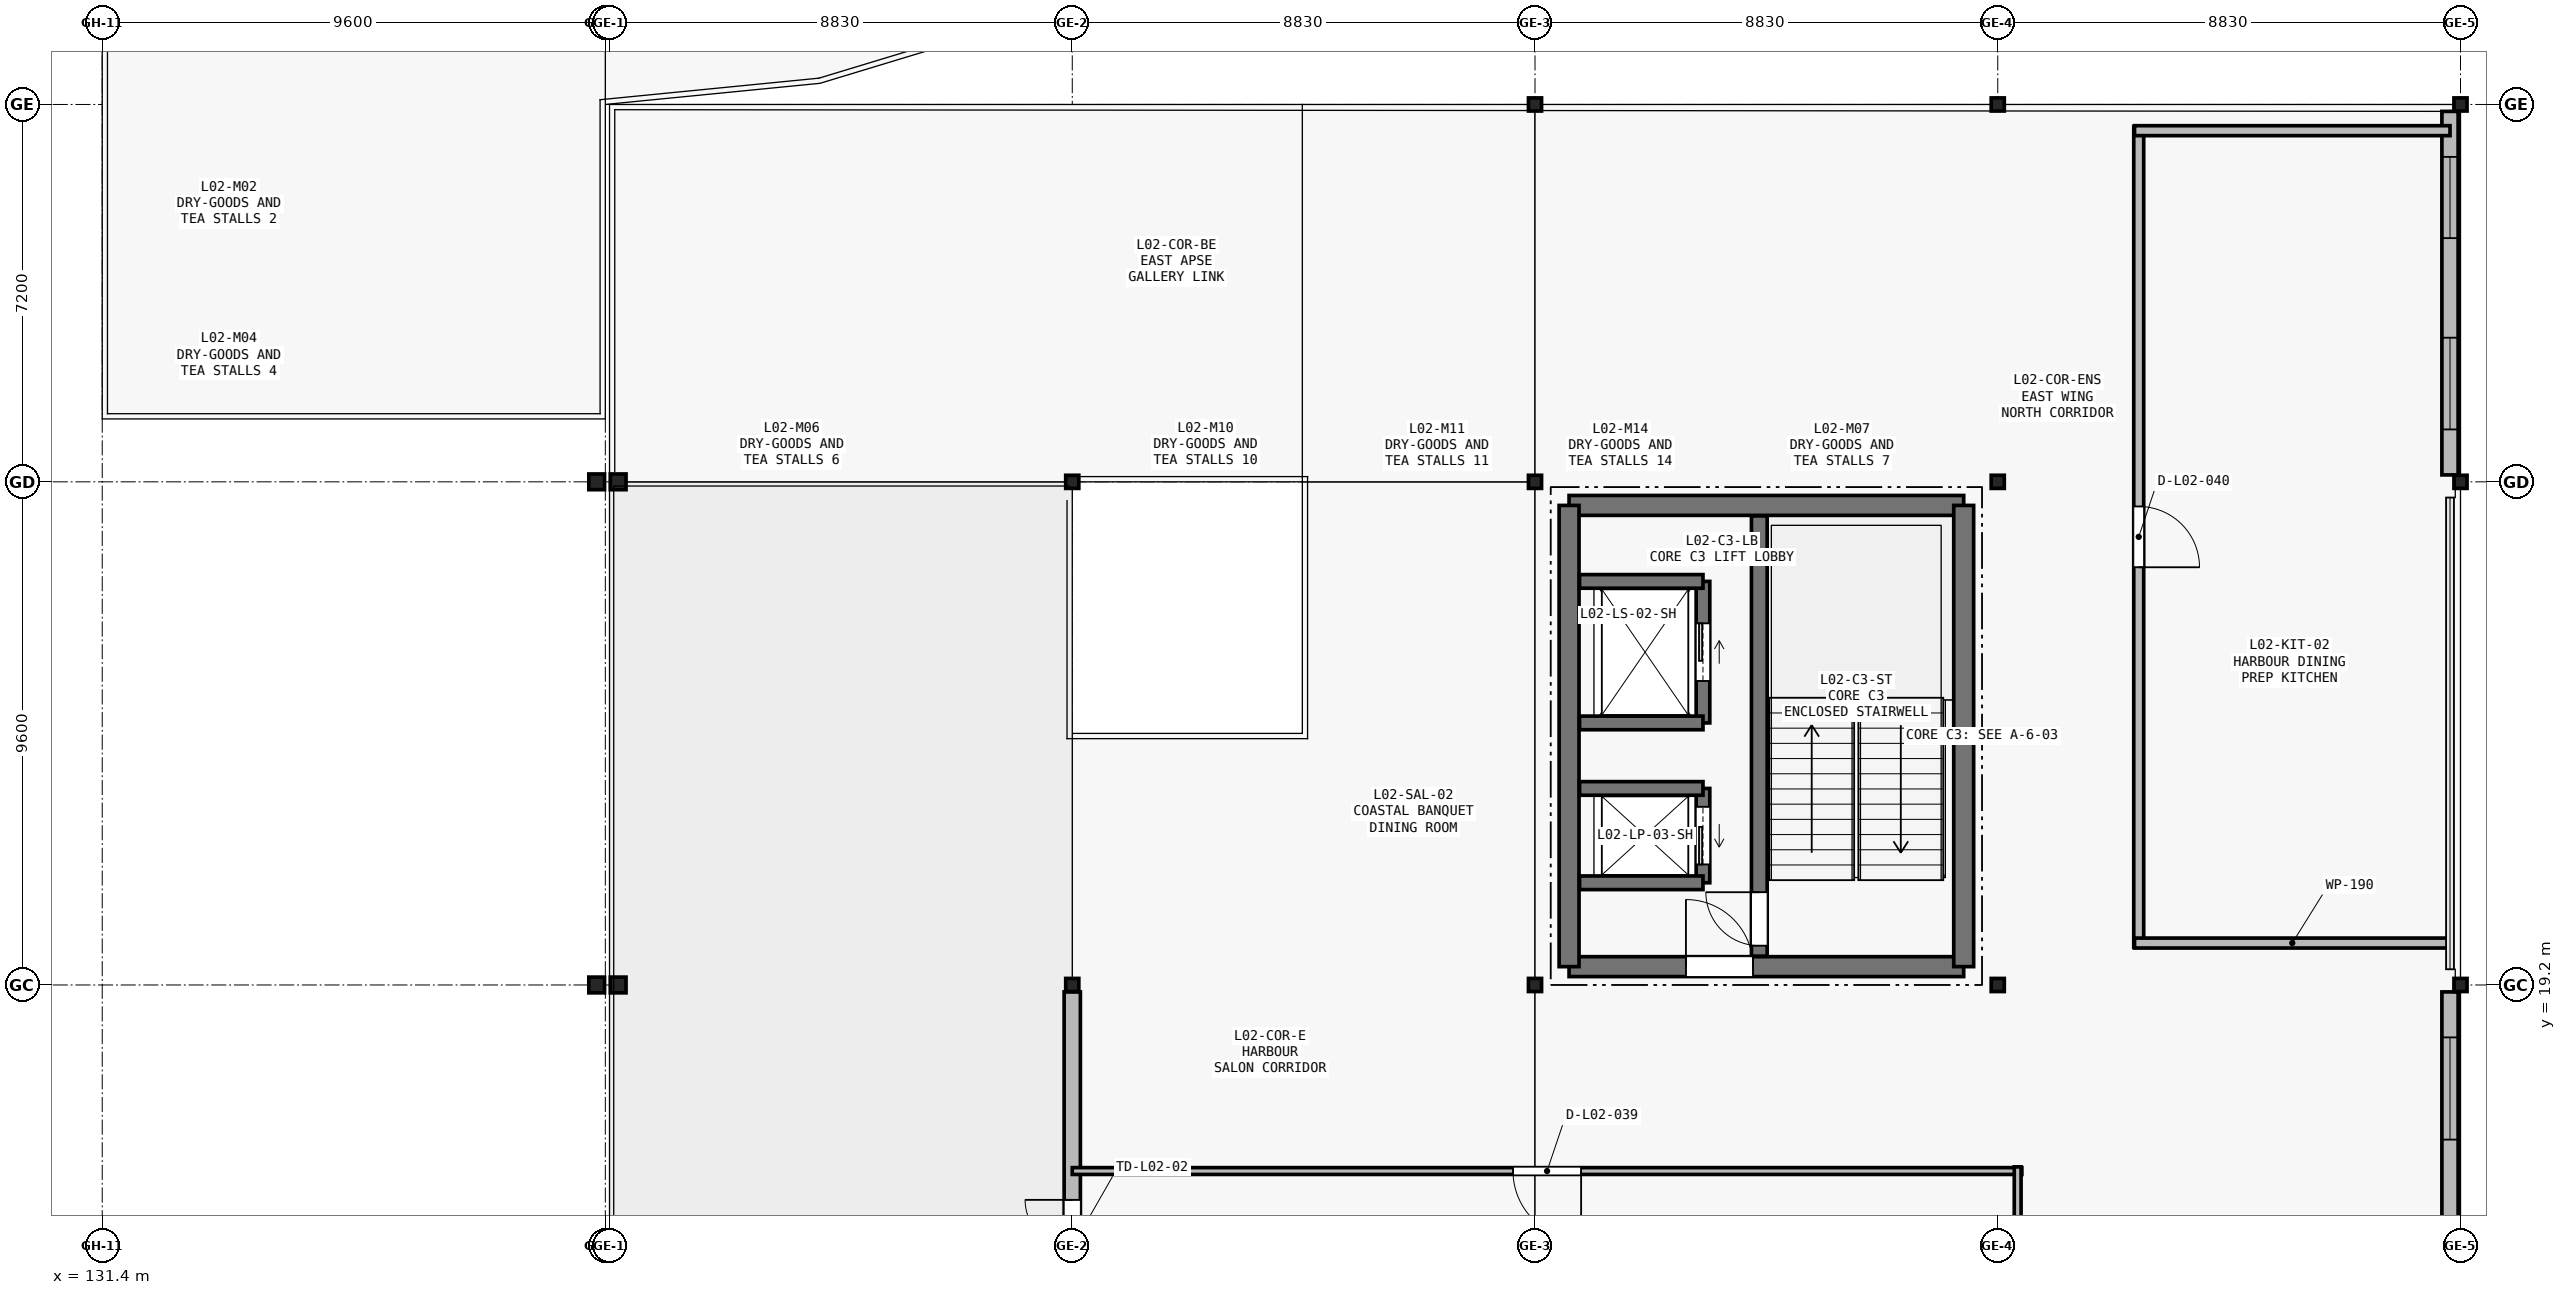
"""IFC4 building model, lengths in metres.
Left out: names, types, materials, properties, quantities, classifications, styles, units other than length and angle.
Written with IfcOpenShell. Run it as: python <this file> out.ifc"""

import sys

from ifc_helpers import new_model, si_unit, direction, frame, frame_2d, origin, origin_2d, place, context, subcontext, project, spatial, rectangle, i_section, extrude, element, fill, save


model = new_model("IFC4")
c1 = context("Model", 3, precision=1e-05, world=origin(), true_north=direction((0.0, 1.0)))
c2 = subcontext(c1, "Body", "Model", "MODEL_VIEW")
j1 = project(units=[si_unit("LENGTHUNIT", "METRE"), si_unit("PLANEANGLEUNIT", "RADIAN")], contexts=[c1])
p1 = place(None, origin())
s1 = spatial("IfcSite", under=j1, at=p1, CompositionType="ELEMENT")
p2 = place(p1, origin())
s2 = spatial("IfcBuilding", under=s1, at=p2, CompositionType="ELEMENT")
p3 = place(p2, frame((0.0, 0.0, 10.8)))
s3 = spatial("IfcBuildingStorey", under=s2, at=p3, CompositionType="ELEMENT", Elevation=10.8)
for number, where, z_axis, x_axis in (
    (1, (140.835, 19.2, 0.0), (0.0, 0.0, 1.0), (1.0, 0.0, 0.0)),
    (2, (140.835, 28.8, 0.0), (0.0, 0.0, 1.0), (1.0, 0.0, 0.0)),
    (3, (141.245, 19.2, 0.0), (0.0, 0.0, 1.0), (1.0, 0.0, 0.0)),
    (4, (141.245, 28.8, 0.0), (0.0, 0.0, 1.0), (1.0, 0.0, 0.0)),
):
    element("IfcColumn", number, at=place(p3, frame(where, z_axis=z_axis, x_axis=x_axis)), inside=s3, PredefinedType="COLUMN", context=c2, shape_type="SweptSolid", body=[
        extrude(i_section(OverallWidth=0.3, OverallDepth=0.3, WebThickness=0.01, FlangeThickness=0.015, FilletRadius=0.018, at=origin_2d()), origin(), (0.0, 0.0, 1.0), 4.2),
    ])
for number, where, z_axis, x_axis in (
    (5, (149.91, 19.2, 0.0), (0.0, 0.0, 1.0), (1.0, 0.0, 0.0)),
    (6, (149.91, 28.8, 0.0), (0.0, 0.0, 1.0), (1.0, 0.0, 0.0)),
    (7, (158.74, 19.2, 0.0), (0.0, 0.0, 1.0), (1.0, 0.0, 0.0)),
    (8, (158.74, 28.8, 0.0), (0.0, 0.0, 1.0), (1.0, 0.0, 0.0)),
    (9, (158.74, 36.0, 0.0), (0.0, 0.0, 1.0), (1.0, 0.0, 0.0)),
    (10, (167.57, 19.2, 0.0), (0.0, 0.0, 1.0), (1.0, 0.0, 0.0)),
    (11, (167.57, 28.8, 0.0), (0.0, 0.0, 1.0), (1.0, 0.0, 0.0)),
    (12, (167.57, 36.0, 0.0), (0.0, 0.0, 1.0), (1.0, 0.0, 0.0)),
    (13, (176.4, 19.2, 0.0), (0.0, 0.0, 1.0), (1.0, 0.0, 0.0)),
    (14, (176.4, 28.8, 0.0), (0.0, 0.0, 1.0), (1.0, 0.0, 0.0)),
    (15, (176.4, 36.0, 0.0), (0.0, 0.0, 1.0), (1.0, 0.0, 0.0)),
):
    element("IfcColumn", number, at=place(p3, frame(where, z_axis=z_axis, x_axis=x_axis)), inside=s3, PredefinedType="COLUMN", context=c2, shape_type="SweptSolid", body=[
        extrude(i_section(OverallWidth=0.25, OverallDepth=0.25, WebThickness=0.009, FlangeThickness=0.014, FilletRadius=0.016, at=origin_2d()), origin(), (0.0, 0.0, 1.0), 4.2),
    ])
p4 = place(p3, frame((176.2, 35.868, 0.0), z_axis=(0.0, 0.0, 1.0), x_axis=(0.0, -1.0, 0.0)))
e16 = element("IfcWall", 16, at=p4, inside=s3, PredefinedType="SOLIDWALL", context=c2, shape_type="SweptSolid", body=[
    extrude(rectangle(XDim=6.936, YDim=0.31, at=frame_2d((3.468, 0.0))), origin(), (0.0, 0.0, 1.0), 3.35),
])
p5 = place(p4, frame((0.868, 0.0, 0.95)))
e17 = element("IfcOpeningElement", 17, at=p5, cuts=e16, PredefinedType="OPENING", context=c2, shape_type="SweptSolid", body=[
    extrude(rectangle(XDim=1.55, YDim=1.65, at=frame_2d((0.775, 0.825))), frame((0.0, 0.165, 0.0), z_axis=(0.0, -1.0, 0.0), x_axis=(1.0, 0.0, 0.0)), (0.0, 0.0, 1.0), 0.33),
])
p6 = place(p4, frame((4.318, 0.0, 0.95)))
e18 = element("IfcOpeningElement", 18, at=p6, cuts=e16, PredefinedType="OPENING", context=c2, shape_type="SweptSolid", body=[
    extrude(rectangle(XDim=1.75, YDim=1.65, at=frame_2d((0.875, 0.825))), frame((0.0, 0.165, 0.0), z_axis=(0.0, -1.0, 0.0), x_axis=(1.0, 0.0, 0.0)), (0.0, 0.0, 1.0), 0.33),
])
p7 = place(p3, frame((176.2, 19.068, 0.0), z_axis=(0.0, 0.0, 1.0), x_axis=(0.0, -1.0, 0.0)))
e19 = element("IfcWall", 19, at=p7, inside=s3, PredefinedType="SOLIDWALL", context=c2, shape_type="SweptSolid", body=[
    extrude(rectangle(XDim=9.336, YDim=0.31, at=frame_2d((4.668, 0.0))), origin(), (0.0, 0.0, 1.0), 3.35),
])
p8 = place(p7, frame((0.868, 0.0, 0.95)))
e20 = element("IfcOpeningElement", 20, at=p8, cuts=e19, PredefinedType="OPENING", context=c2, shape_type="SweptSolid", body=[
    extrude(rectangle(XDim=1.95, YDim=1.65, at=frame_2d((0.975, 0.825))), frame((0.0, 0.165, 0.0), z_axis=(0.0, -1.0, 0.0), x_axis=(1.0, 0.0, 0.0)), (0.0, 0.0, 1.0), 0.33),
])
p9 = place(p7, frame((6.318, 0.0, 0.95)))
e21 = element("IfcOpeningElement", 21, at=p9, cuts=e19, PredefinedType="OPENING", context=c2, shape_type="SweptSolid", body=[
    extrude(rectangle(XDim=2.15, YDim=1.65, at=frame_2d((1.075, 0.825))), frame((0.0, 0.165, 0.0), z_axis=(0.0, -1.0, 0.0), x_axis=(1.0, 0.0, 0.0)), (0.0, 0.0, 1.0), 0.33),
])
p10 = place(p3, frame((149.91, 9.732, 0.0), z_axis=(0.0, 0.0, 1.0), x_axis=(0.0, 1.0, 0.0)))
e22 = element("IfcWall", 22, at=p10, inside=s3, PredefinedType="SOLIDWALL", context=c2, shape_type="SweptSolid", body=[
    extrude(rectangle(XDim=9.336, YDim=0.31, at=frame_2d((4.668, 0.0))), origin(), (0.0, 0.0, 1.0), 3.35),
])
p11 = place(p10, frame((3.568, 0.0, 0.0)))
e23 = element("IfcOpeningElement", 23, at=p11, cuts=e22, PredefinedType="OPENING", context=c2, shape_type="SweptSolid", body=[
    extrude(rectangle(XDim=1.8, YDim=2.2, at=frame_2d((0.9, 1.1))), frame((0.0, 0.165, 0.0), z_axis=(0.0, -1.0, 0.0), x_axis=(1.0, 0.0, 0.0)), (0.0, 0.0, 1.0), 0.33),
])
p12 = place(p10, frame((0.818, 0.0, 0.95)))
e24 = element("IfcOpeningElement", 24, at=p12, cuts=e22, PredefinedType="OPENING", context=c2, shape_type="SweptSolid", body=[
    extrude(rectangle(XDim=1.35, YDim=1.65, at=frame_2d((0.675, 0.825))), frame((0.0, 0.165, 0.0), z_axis=(0.0, -1.0, 0.0), x_axis=(1.0, 0.0, 0.0)), (0.0, 0.0, 1.0), 0.33),
])
p13 = place(p3, frame((159.39, 19.55, 0.0), z_axis=(0.0, 0.0, 1.0), x_axis=(1.0, 0.0, 0.0)))
e25 = element("IfcWall", 25, at=p13, inside=s3, PredefinedType="SHEAR", context=c2, shape_type="SweptSolid", body=[
    extrude(rectangle(XDim=7.53, YDim=0.38, at=frame_2d((3.765, 0.0))), origin(), (0.0, 0.0, 1.0), 4.2),
])
p14 = place(p13, frame((2.23, 0.0, 0.0)))
e26 = element("IfcOpeningElement", 26, at=p14, cuts=e25, PredefinedType="OPENING", context=c2, shape_type="SweptSolid", body=[
    extrude(rectangle(XDim=1.28, YDim=2.15, at=frame_2d((0.64, 1.075))), frame((0.0, 0.2, 0.0), z_axis=(0.0, -1.0, 0.0), x_axis=(1.0, 0.0, 0.0)), (0.0, 0.0, 1.0), 0.4),
])
p15 = place(p3, frame((166.92, 28.35, 0.0), z_axis=(0.0, 0.0, 1.0), x_axis=(-1.0, 0.0, 0.0)))
e27 = element("IfcWall", 27, at=p15, inside=s3, PredefinedType="SHEAR", context=c2, shape_type="SweptSolid", body=[
    extrude(rectangle(XDim=7.53, YDim=0.38, at=frame_2d((3.765, 0.0))), origin(), (0.0, 0.0, 1.0), 4.2),
])
for number, where, z_axis, x_axis in (
    (28, (159.39, 28.35, 0.0), (0.0, 0.0, 1.0), (0.0, -1.0, 0.0)),
    (29, (166.92, 19.55, 0.0), (0.0, 0.0, 1.0), (0.0, 1.0, 0.0)),
):
    element("IfcWall", number, at=place(p3, frame(where, z_axis=z_axis, x_axis=x_axis)), inside=s3, PredefinedType="SHEAR", context=c2, shape_type="SweptSolid", body=[
        extrude(rectangle(XDim=8.8, YDim=0.38, at=frame_2d((4.4, 0.0))), origin(), (0.0, 0.0, 1.0), 4.2),
    ])
p16 = place(p3, frame((163.02, 19.75, 0.0), z_axis=(0.0, 0.0, 1.0), x_axis=(0.0, 1.0, 0.0)))
e30 = element("IfcWall", 30, at=p16, inside=s3, PredefinedType="SHEAR", context=c2, shape_type="SweptSolid", body=[
    extrude(rectangle(XDim=8.4, YDim=0.3, at=frame_2d((4.2, 0.0))), origin(), (0.0, 0.0, 1.0), 4.2),
])
p17 = place(p16, frame((0.2, 0.0, 0.0)))
e31 = element("IfcOpeningElement", 31, at=p17, cuts=e30, PredefinedType="OPENING", context=c2, shape_type="SweptSolid", body=[
    extrude(rectangle(XDim=1.02, YDim=2.1, at=frame_2d((0.51, 1.05))), frame((0.0, 0.16, 0.0), z_axis=(0.0, -1.0, 0.0), x_axis=(1.0, 0.0, 0.0)), (0.0, 0.0, 1.0), 0.32),
])
p18 = place(p3, frame((161.945, 21.15, 0.0), z_axis=(0.0, 0.0, 1.0), x_axis=(0.0, 1.0, 0.0)))
e32 = element("IfcWall", 32, at=p18, inside=s3, PredefinedType="SHEAR", context=c2, shape_type="SweptSolid", body=[
    extrude(rectangle(XDim=1.8, YDim=0.26, at=frame_2d((0.9, 0.0))), origin(), (0.0, 0.0, 1.0), 4.2),
])
p19 = place(p18, frame((0.35, 0.0, 0.0)))
e33 = element("IfcOpeningElement", 33, at=p19, cuts=e32, PredefinedType="OPENING", context=c2, shape_type="SweptSolid", body=[
    extrude(rectangle(XDim=1.1, YDim=2.15, at=frame_2d((0.55, 1.075))), frame((0.0, 0.14, 0.0), z_axis=(0.0, -1.0, 0.0), x_axis=(1.0, 0.0, 0.0)), (0.0, 0.0, 1.0), 0.28),
])
for number, where, z_axis, x_axis in (
    (34, (159.59, 21.15, 0.0), (0.0, 0.0, 1.0), (1.0, 0.0, 0.0)),
    (35, (159.59, 22.95, 0.0), (0.0, 0.0, 1.0), (1.0, 0.0, 0.0)),
):
    element("IfcWall", number, at=place(p3, frame(where, z_axis=z_axis, x_axis=x_axis)), inside=s3, PredefinedType="SHEAR", context=c2, shape_type="SweptSolid", body=[
        extrude(rectangle(XDim=2.355, YDim=0.26, at=frame_2d((1.177, 0.0))), origin(), (0.0, 0.0, 1.0), 4.2),
    ])
p20 = place(p3, frame((161.945, 24.2, 0.0), z_axis=(0.0, 0.0, 1.0), x_axis=(0.0, 1.0, 0.0)))
e36 = element("IfcWall", 36, at=p20, inside=s3, PredefinedType="SHEAR", context=c2, shape_type="SweptSolid", body=[
    extrude(rectangle(XDim=2.7, YDim=0.26, at=frame_2d((1.35, 0.0))), origin(), (0.0, 0.0, 1.0), 4.2),
])
p21 = place(p20, frame((0.8, 0.0, 0.0)))
e37 = element("IfcOpeningElement", 37, at=p21, cuts=e36, PredefinedType="OPENING", context=c2, shape_type="SweptSolid", body=[
    extrude(rectangle(XDim=1.1, YDim=2.15, at=frame_2d((0.55, 1.075))), frame((0.0, 0.14, 0.0), z_axis=(0.0, -1.0, 0.0), x_axis=(1.0, 0.0, 0.0)), (0.0, 0.0, 1.0), 0.28),
])
for number, where, z_axis, x_axis in (
    (38, (159.59, 24.2, 0.0), (0.0, 0.0, 1.0), (1.0, 0.0, 0.0)),
    (39, (159.59, 26.9, 0.0), (0.0, 0.0, 1.0), (1.0, 0.0, 0.0)),
):
    element("IfcWall", number, at=place(p3, frame(where, z_axis=z_axis, x_axis=x_axis)), inside=s3, PredefinedType="SHEAR", context=c2, shape_type="SweptSolid", body=[
        extrude(rectangle(XDim=2.355, YDim=0.26, at=frame_2d((1.177, 0.0))), origin(), (0.0, 0.0, 1.0), 4.2),
    ])
p22 = place(p3, frame((168.03, 15.65, 0.0), z_axis=(0.0, 0.0, 1.0), x_axis=(-1.0, 0.0, 0.0)))
e40 = element("IfcWall", 40, at=p22, inside=s3, PredefinedType="PARTITIONING", context=c2, shape_type="SweptSolid", body=[
    extrude(rectangle(XDim=18.12, YDim=0.13, at=frame_2d((9.06, 0.0))), origin(), (0.0, 0.0, 1.0), 3.72),
])
p23 = place(p22, frame((8.41, 0.0, 0.0)))
e41 = element("IfcOpeningElement", 41, at=p23, cuts=e40, PredefinedType="OPENING", context=c2, shape_type="SweptSolid", body=[
    extrude(rectangle(XDim=1.3, YDim=2.36, at=frame_2d((0.65, 1.18))), frame((0.0, 0.075, 0.0), z_axis=(0.0, -1.0, 0.0), x_axis=(1.0, 0.0, 0.0)), (0.0, 0.0, 1.0), 0.15),
])
p24 = place(p3, frame((167.95, 0.2, 0.0), z_axis=(0.0, 0.0, 1.0), x_axis=(0.0, 1.0, 0.0)))
e42 = element("IfcWall", 42, at=p24, inside=s3, PredefinedType="PARTITIONING", context=c2, shape_type="SweptSolid", body=[
    extrude(rectangle(XDim=15.53, YDim=0.13, at=frame_2d((7.765, 0.0))), origin(), (0.0, 0.0, 1.0), 3.72),
])
p25 = place(p3, frame((170.26, 35.58, 0.0), z_axis=(0.0, 0.0, 1.0), x_axis=(0.0, -1.0, 0.0)))
e43 = element("IfcWall", 43, at=p25, inside=s3, PredefinedType="PARTITIONING", context=c2, shape_type="SweptSolid", body=[
    extrude(rectangle(XDim=15.66, YDim=0.19, at=frame_2d((7.83, 0.0))), origin(), (0.0, 0.0, 1.0), 3.72),
])
p26 = place(p25, frame((7.25, 0.0, 0.0)))
e44 = element("IfcOpeningElement", 44, at=p26, cuts=e43, PredefinedType="OPENING", context=c2, shape_type="SweptSolid", body=[
    extrude(rectangle(XDim=1.16, YDim=2.26, at=frame_2d((0.58, 1.13))), frame((0.0, 0.105, 0.0), z_axis=(0.0, -1.0, 0.0), x_axis=(1.0, 0.0, 0.0)), (0.0, 0.0, 1.0), 0.21),
])
for number, where, z_axis, x_axis in (
    (45, (170.18, 20.0, 0.0), (0.0, 0.0, 1.0), (1.0, 0.0, 0.0)),
    (46, (176.2, 35.5, 0.0), (0.0, 0.0, 1.0), (-1.0, 0.0, 0.0)),
):
    element("IfcWall", number, at=place(p3, frame(where, z_axis=z_axis, x_axis=x_axis)), inside=s3, PredefinedType="PARTITIONING", context=c2, shape_type="SweptSolid", body=[
        extrude(rectangle(XDim=6.02, YDim=0.19, at=frame_2d((3.01, 0.0))), origin(), (0.0, 0.0, 1.0), 3.72),
    ])
p27 = place(p5, origin())
e47 = element("IfcWindow", 47, at=p27, inside=s3, PartitioningType="SINGLE_PANEL", PredefinedType="WINDOW", context=c2, shape_type="SweptSolid", body=[
    extrude(rectangle(XDim=1.55, YDim=1.65, at=frame_2d((0.775, 0.825))), frame((0.0, 0.03, 0.0), z_axis=(0.0, -1.0, 0.0), x_axis=(1.0, 0.0, 0.0)), (0.0, 0.0, 1.0), 0.06),
])
fill(e17, e47)
p28 = place(p6, origin())
e48 = element("IfcWindow", 48, at=p28, inside=s3, PartitioningType="SINGLE_PANEL", PredefinedType="WINDOW", context=c2, shape_type="SweptSolid", body=[
    extrude(rectangle(XDim=1.75, YDim=1.65, at=frame_2d((0.875, 0.825))), frame((0.0, 0.03, 0.0), z_axis=(0.0, -1.0, 0.0), x_axis=(1.0, 0.0, 0.0)), (0.0, 0.0, 1.0), 0.06),
])
fill(e18, e48)
p29 = place(p8, origin())
e49 = element("IfcWindow", 49, at=p29, inside=s3, PartitioningType="SINGLE_PANEL", PredefinedType="WINDOW", context=c2, shape_type="SweptSolid", body=[
    extrude(rectangle(XDim=1.95, YDim=1.65, at=frame_2d((0.975, 0.825))), frame((0.0, 0.03, 0.0), z_axis=(0.0, -1.0, 0.0), x_axis=(1.0, 0.0, 0.0)), (0.0, 0.0, 1.0), 0.06),
])
fill(e20, e49)
p30 = place(p11, origin())
e50 = element("IfcDoor", 50, at=p30, inside=s3, OperationType="DOUBLE_DOOR_SINGLE_SWING", PredefinedType="DOOR", context=c2, shape_type="SweptSolid", body=[
    extrude(rectangle(XDim=1.8, YDim=2.2, at=frame_2d((0.9, 1.1))), frame((0.0, 0.025, 0.0), z_axis=(0.0, -1.0, 0.0), x_axis=(1.0, 0.0, 0.0)), (0.0, 0.0, 1.0), 0.05),
])
fill(e23, e50)
p31 = place(p14, origin())
e51 = element("IfcDoor", 51, at=p31, inside=s3, OperationType="SINGLE_SWING_LEFT", PredefinedType="DOOR", context=c2, shape_type="SweptSolid", body=[
    extrude(rectangle(XDim=1.28, YDim=2.15, at=frame_2d((0.64, 1.075))), frame((0.0, 0.025, 0.0), z_axis=(0.0, -1.0, 0.0), x_axis=(1.0, 0.0, 0.0)), (0.0, 0.0, 1.0), 0.05),
])
fill(e26, e51)
p32 = place(p17, origin())
e52 = element("IfcDoor", 52, at=p32, inside=s3, OperationType="SINGLE_SWING_RIGHT", PredefinedType="DOOR", context=c2, shape_type="SweptSolid", body=[
    extrude(rectangle(XDim=1.02, YDim=2.1, at=frame_2d((0.51, 1.05))), frame((0.0, 0.025, 0.0), z_axis=(0.0, -1.0, 0.0), x_axis=(1.0, 0.0, 0.0)), (0.0, 0.0, 1.0), 0.05),
])
fill(e31, e52)
p33 = place(p19, origin())
e53 = element("IfcDoor", 53, at=p33, inside=s3, OperationType="SLIDING_TO_LEFT", PredefinedType="DOOR", context=c2, shape_type="SweptSolid", body=[
    extrude(rectangle(XDim=1.1, YDim=2.15, at=frame_2d((0.55, 1.075))), frame((0.0, 0.025, 0.0), z_axis=(0.0, -1.0, 0.0), x_axis=(1.0, 0.0, 0.0)), (0.0, 0.0, 1.0), 0.05),
])
fill(e33, e53)
p34 = place(p21, origin())
e54 = element("IfcDoor", 54, at=p34, inside=s3, OperationType="SLIDING_TO_RIGHT", PredefinedType="DOOR", context=c2, shape_type="SweptSolid", body=[
    extrude(rectangle(XDim=1.1, YDim=2.15, at=frame_2d((0.55, 1.075))), frame((0.0, 0.025, 0.0), z_axis=(0.0, -1.0, 0.0), x_axis=(1.0, 0.0, 0.0)), (0.0, 0.0, 1.0), 0.05),
])
fill(e37, e54)
p35 = place(p23, origin())
e55 = element("IfcDoor", 55, at=p35, inside=s3, OperationType="SINGLE_SWING_LEFT", PredefinedType="DOOR", context=c2, shape_type="SweptSolid", body=[
    extrude(rectangle(XDim=1.3, YDim=2.36, at=frame_2d((0.65, 1.18))), frame((0.0, 0.025, 0.0), z_axis=(0.0, -1.0, 0.0), x_axis=(1.0, 0.0, 0.0)), (0.0, 0.0, 1.0), 0.05),
])
fill(e41, e55)
p36 = place(p26, origin())
e56 = element("IfcDoor", 56, at=p36, inside=s3, OperationType="SINGLE_SWING_RIGHT", PredefinedType="DOOR", context=c2, shape_type="SweptSolid", body=[
    extrude(rectangle(XDim=1.16, YDim=2.26, at=frame_2d((0.58, 1.13))), frame((0.0, 0.025, 0.0), z_axis=(0.0, -1.0, 0.0), x_axis=(1.0, 0.0, 0.0)), (0.0, 0.0, 1.0), 0.05),
])
fill(e44, e56)
save(model, sys.argv[1])
